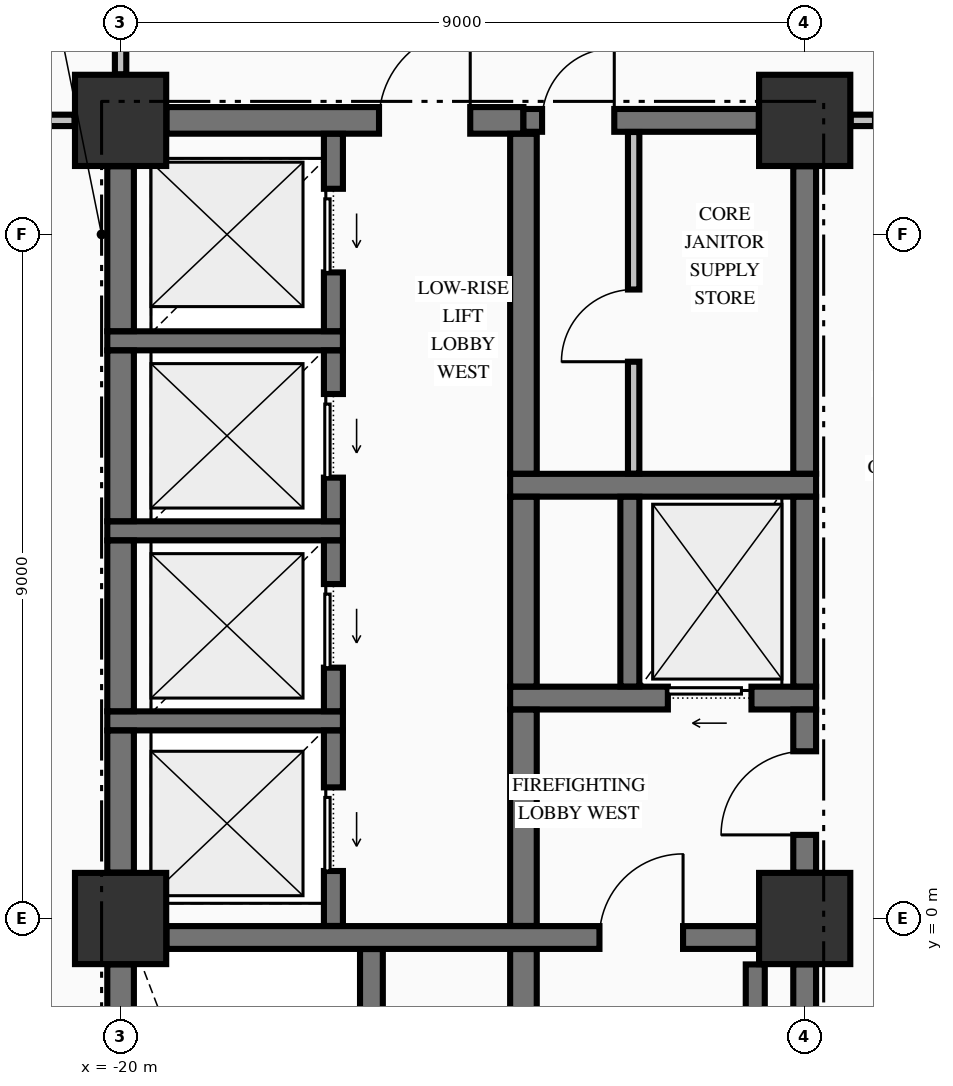
"""IFC4 building model, lengths in metres.
Left out: names, types, materials, properties, quantities, classifications, styles, units other than length and angle.
Written with IfcOpenShell. Run it as: python <this file> out.ifc"""

import sys

from ifc_helpers import new_model, si_unit, direction, frame, frame_2d, origin, origin_2d, place, context, subcontext, project, spatial, rectangle, extrude, element, fill, save


model = new_model("IFC4")
c1 = context("Model", 3, precision=1e-05, world=origin(), true_north=direction((0.0, 1.0)))
c2 = subcontext(c1, "Body", "Model", "MODEL_VIEW")
j1 = project(units=[si_unit("LENGTHUNIT", "METRE"), si_unit("PLANEANGLEUNIT", "RADIAN")], contexts=[c1])
p1 = place(None, origin())
s1 = spatial("IfcSite", under=j1, at=p1, CompositionType="ELEMENT")
p2 = place(p1, origin())
s2 = spatial("IfcBuilding", under=s1, at=p2, CompositionType="ELEMENT")
p3 = place(p2, frame((0.0, 0.0, 78.61)))
s3 = spatial("IfcBuildingStorey", under=s2, at=p3, CompositionType="ELEMENT", Elevation=78.61)
for number, where, z_axis, x_axis in (
    (1, (-20.0, 10.5, -0.25), (0.0, 0.0, 1.0), (1.0, 0.0, 0.0)),
    (2, (-11.0, 0.0, -0.25), (0.0, 0.0, 1.0), (1.0, 0.0, 0.0)),
    (3, (-11.0, 10.5, -0.25), (0.0, 0.0, 1.0), (1.0, 0.0, 0.0)),
    (4, (-20.0, 0.0, -0.25), (0.0, 0.0, 1.0), (1.0, 0.0, 0.0)),
):
    element("IfcColumn", number, at=place(p3, frame(where, z_axis=z_axis, x_axis=x_axis)), inside=s3, PredefinedType="COLUMN", context=c2, shape_type="SweptSolid", body=[
        extrude(rectangle(XDim=1.2, YDim=1.2, at=origin_2d()), origin(), (0.0, 0.0, 1.0), 3.395),
    ])
p4 = place(p3, frame((-19.396, -0.25, 0.0), z_axis=(0.0, 0.0, 1.0), x_axis=(1.0, 0.0, 0.0)))
e5 = element("IfcWall", 5, at=p4, inside=s3, PredefinedType="SHEAR", context=c2, shape_type="SweptSolid", body=[
    extrude(rectangle(XDim=7.792, YDim=0.3, at=frame_2d((3.896, 0.0))), origin(), (0.0, 0.0, 1.0), 3.145),
])
p5 = place(p4, frame((5.696, 0.0, 0.0)))
e6 = element("IfcOpeningElement", 6, at=p5, cuts=e5, PredefinedType="OPENING", context=c2, shape_type="SweptSolid", body=[
    extrude(rectangle(XDim=1.1, YDim=2.15, at=frame_2d((0.55, 1.075))), frame((0.0, 0.16, 0.0), z_axis=(0.0, -1.0, 0.0), x_axis=(1.0, 0.0, 0.0)), (0.0, 0.0, 1.0), 0.32),
])
p6 = place(p3, frame((-20.175, 2.6, 0.0), z_axis=(0.0, 0.0, 1.0), x_axis=(1.0, 0.0, 0.0)))
e7 = element("IfcWall", 7, at=p6, inside=s3, PredefinedType="SOLIDWALL", context=c2, shape_type="SweptSolid", body=[
    extrude(rectangle(XDim=3.1, YDim=0.25, at=frame_2d((1.55, 0.0))), origin(), (0.0, 0.0, 1.0), 3.145),
])
p7 = place(p3, frame((-14.875, 2.9, 0.0), z_axis=(0.0, 0.0, 1.0), x_axis=(1.0, 0.0, 0.0)))
e8 = element("IfcWall", 8, at=p7, inside=s3, PredefinedType="SHEAR", context=c2, shape_type="SweptSolid", body=[
    extrude(rectangle(XDim=4.025, YDim=0.3, at=frame_2d((2.012, 0.0))), origin(), (0.0, 0.0, 1.0), 3.145),
])
p8 = place(p7, frame((2.075, 0.0, 0.0)))
e9 = element("IfcOpeningElement", 9, at=p8, cuts=e8, PredefinedType="OPENING", context=c2, shape_type="SweptSolid", body=[
    extrude(rectangle(XDim=1.1, YDim=2.2, at=frame_2d((0.55, 1.1))), frame((0.0, 0.16, 0.0), z_axis=(0.0, -1.0, 0.0), x_axis=(1.0, 0.0, 0.0)), (0.0, 0.0, 1.0), 0.32),
])
p9 = place(p3, frame((-20.175, 5.1, 0.0), z_axis=(0.0, 0.0, 1.0), x_axis=(1.0, 0.0, 0.0)))
e10 = element("IfcWall", 10, at=p9, inside=s3, PredefinedType="SOLIDWALL", context=c2, shape_type="SweptSolid", body=[
    extrude(rectangle(XDim=3.1, YDim=0.25, at=frame_2d((1.55, 0.0))), origin(), (0.0, 0.0, 1.0), 3.145),
])
p10 = place(p3, frame((-14.875, 5.7, 0.0), z_axis=(0.0, 0.0, 1.0), x_axis=(1.0, 0.0, 0.0)))
e11 = element("IfcWall", 11, at=p10, inside=s3, PredefinedType="SHEAR", context=c2, shape_type="SweptSolid", body=[
    extrude(rectangle(XDim=4.025, YDim=0.3, at=frame_2d((2.012, 0.0))), origin(), (0.0, 0.0, 1.0), 3.145),
])
p11 = place(p3, frame((-20.175, 7.6, 0.0), z_axis=(0.0, 0.0, 1.0), x_axis=(1.0, 0.0, 0.0)))
e12 = element("IfcWall", 12, at=p11, inside=s3, PredefinedType="SOLIDWALL", context=c2, shape_type="SweptSolid", body=[
    extrude(rectangle(XDim=3.1, YDim=0.25, at=frame_2d((1.55, 0.0))), origin(), (0.0, 0.0, 1.0), 3.145),
])
p12 = place(p3, frame((-19.396, 10.5, 0.0), z_axis=(0.0, 0.0, 1.0), x_axis=(1.0, 0.0, 0.0)))
e13 = element("IfcWall", 13, at=p12, inside=s3, PredefinedType="SHEAR", context=c2, shape_type="SweptSolid", body=[
    extrude(rectangle(XDim=4.696, YDim=0.35, at=frame_2d((2.348, 0.0))), origin(), (0.0, 0.0, 1.0), 3.145),
])
p13 = place(p12, frame((2.796, 0.0, 0.0)))
e14 = element("IfcOpeningElement", 14, at=p13, cuts=e13, PredefinedType="OPENING", context=c2, shape_type="SweptSolid", body=[
    extrude(rectangle(XDim=1.2, YDim=2.15, at=frame_2d((0.6, 1.075))), frame((0.0, 0.185, 0.0), z_axis=(0.0, -1.0, 0.0), x_axis=(1.0, 0.0, 0.0)), (0.0, 0.0, 1.0), 0.37),
])
p14 = place(p3, frame((-14.7, 10.5, 0.0), z_axis=(0.0, 0.0, 1.0), x_axis=(1.0, 0.0, 0.0)))
e15 = element("IfcWall", 15, at=p14, inside=s3, PredefinedType="SHEAR", context=c2, shape_type="SweptSolid", body=[
    extrude(rectangle(XDim=3.096, YDim=0.3, at=frame_2d((1.548, 0.0))), origin(), (0.0, 0.0, 1.0), 3.145),
])
p15 = place(p14, frame((0.245, 0.0, 0.0)))
e16 = element("IfcOpeningElement", 16, at=p15, cuts=e15, PredefinedType="OPENING", context=c2, shape_type="SweptSolid", body=[
    extrude(rectangle(XDim=0.95, YDim=2.15, at=frame_2d((0.475, 1.075))), frame((0.0, 0.16, 0.0), z_axis=(0.0, -1.0, 0.0), x_axis=(1.0, 0.0, 0.0)), (0.0, 0.0, 1.0), 0.32),
])
p16 = place(p3, frame((-28.835, 10.5, 0.0), z_axis=(0.0, 0.0, 1.0), x_axis=(1.0, 0.0, 0.0)))
e17 = element("IfcWall", 17, at=p16, inside=s3, PredefinedType="PARTITIONING", context=c2, shape_type="SweptSolid", body=[
    extrude(rectangle(XDim=8.229, YDim=0.15, at=frame_2d((4.115, 0.0))), origin(), (0.0, 0.0, 1.0), 3.145),
])
p17 = place(p16, frame((3.86, 0.0, 0.0)))
e18 = element("IfcOpeningElement", 18, at=p17, cuts=e17, PredefinedType="OPENING", context=c2, shape_type="SweptSolid", body=[
    extrude(rectangle(XDim=0.95, YDim=2.15, at=frame_2d((0.475, 1.075))), frame((0.0, 0.085, 0.0), z_axis=(0.0, -1.0, 0.0), x_axis=(1.0, 0.0, 0.0)), (0.0, 0.0, 1.0), 0.17),
])
p18 = place(p3, frame((-10.394, 10.5, 0.0), z_axis=(0.0, 0.0, 1.0), x_axis=(1.0, 0.0, 0.0)))
e19 = element("IfcWall", 19, at=p18, inside=s3, PredefinedType="PARTITIONING", context=c2, shape_type="SweptSolid", body=[
    extrude(rectangle(XDim=20.788, YDim=0.15, at=frame_2d((10.394, 0.0))), origin(), (0.0, 0.0, 1.0), 3.145),
])
p19 = place(p18, frame((0.319, 0.0, 0.0)))
e20 = element("IfcOpeningElement", 20, at=p19, cuts=e19, PredefinedType="OPENING", context=c2, shape_type="SweptSolid", body=[
    extrude(rectangle(XDim=1.05, YDim=2.15, at=frame_2d((0.525, 1.075))), frame((0.0, 0.085, 0.0), z_axis=(0.0, -1.0, 0.0), x_axis=(1.0, 0.0, 0.0)), (0.0, 0.0, 1.0), 0.17),
])
p20 = place(p18, frame((19.419, 0.0, 0.0)))
e21 = element("IfcOpeningElement", 21, at=p20, cuts=e19, PredefinedType="OPENING", context=c2, shape_type="SweptSolid", body=[
    extrude(rectangle(XDim=1.05, YDim=2.15, at=frame_2d((0.525, 1.075))), frame((0.0, 0.085, 0.0), z_axis=(0.0, -1.0, 0.0), x_axis=(1.0, 0.0, 0.0)), (0.0, 0.0, 1.0), 0.17),
])
p21 = place(p3, frame((-20.0, -9.346, 0.0), z_axis=(0.0, 0.0, 1.0), x_axis=(0.0, 1.0, 0.0)))
e22 = element("IfcWall", 22, at=p21, inside=s3, PredefinedType="SHEAR", context=c2, shape_type="SweptSolid", body=[
    extrude(rectangle(XDim=8.742, YDim=0.35, at=frame_2d((4.371, 0.0))), origin(), (0.0, 0.0, 1.0), 3.145),
])
p22 = place(p3, frame((-20.0, 0.604, 0.0), z_axis=(0.0, 0.0, 1.0), x_axis=(0.0, 1.0, 0.0)))
e23 = element("IfcWall", 23, at=p22, inside=s3, PredefinedType="SHEAR", context=c2, shape_type="SweptSolid", body=[
    extrude(rectangle(XDim=1.869, YDim=0.35, at=frame_2d((0.935, 0.0))), origin(), (0.0, 0.0, 1.0), 3.145),
])
for number, where, z_axis, x_axis in (
    (24, (-20.0, 2.727, 0.0), (0.0, 0.0, 1.0), (0.0, 1.0, 0.0)),
    (25, (-20.0, 5.227, 0.0), (0.0, 0.0, 1.0), (0.0, 1.0, 0.0)),
):
    element("IfcWall", number, at=place(p3, frame(where, z_axis=z_axis, x_axis=x_axis)), inside=s3, PredefinedType="SHEAR", context=c2, shape_type="SweptSolid", body=[
        extrude(rectangle(XDim=2.246, YDim=0.35, at=frame_2d((1.123, 0.0))), origin(), (0.0, 0.0, 1.0), 3.145),
    ])
p23 = place(p3, frame((-20.0, 7.727, 0.0), z_axis=(0.0, 0.0, 1.0), x_axis=(0.0, 1.0, 0.0)))
e26 = element("IfcWall", 26, at=p23, inside=s3, PredefinedType="SHEAR", context=c2, shape_type="SweptSolid", body=[
    extrude(rectangle(XDim=2.169, YDim=0.35, at=frame_2d((1.084, 0.0))), origin(), (0.0, 0.0, 1.0), 3.145),
])
p24 = place(p3, frame((-17.2, -0.098, 0.0), z_axis=(0.0, 0.0, 1.0), x_axis=(0.0, 1.0, 0.0)))
e27 = element("IfcWall", 27, at=p24, inside=s3, PredefinedType="SOLIDWALL", context=c2, shape_type="SweptSolid", body=[
    extrude(rectangle(XDim=2.571, YDim=0.25, at=frame_2d((1.285, 0.0))), origin(), (0.0, 0.0, 1.0), 3.145),
])
p25 = place(p24, frame((0.723, 0.0, 0.0)))
e28 = element("IfcOpeningElement", 28, at=p25, cuts=e27, PredefinedType="OPENING", context=c2, shape_type="SweptSolid", body=[
    extrude(rectangle(XDim=1.1, YDim=2.2, at=frame_2d((0.55, 1.1))), frame((0.0, 0.135, 0.0), z_axis=(0.0, -1.0, 0.0), x_axis=(1.0, 0.0, 0.0)), (0.0, 0.0, 1.0), 0.27),
])
p26 = place(p3, frame((-17.2, 2.727, 0.0), z_axis=(0.0, 0.0, 1.0), x_axis=(0.0, 1.0, 0.0)))
e29 = element("IfcWall", 29, at=p26, inside=s3, PredefinedType="SOLIDWALL", context=c2, shape_type="SweptSolid", body=[
    extrude(rectangle(XDim=2.246, YDim=0.25, at=frame_2d((1.123, 0.0))), origin(), (0.0, 0.0, 1.0), 3.145),
])
p27 = place(p26, frame((0.573, 0.0, 0.0)))
e30 = element("IfcOpeningElement", 30, at=p27, cuts=e29, PredefinedType="OPENING", context=c2, shape_type="SweptSolid", body=[
    extrude(rectangle(XDim=1.1, YDim=2.2, at=frame_2d((0.55, 1.1))), frame((0.0, 0.135, 0.0), z_axis=(0.0, -1.0, 0.0), x_axis=(1.0, 0.0, 0.0)), (0.0, 0.0, 1.0), 0.27),
])
p28 = place(p3, frame((-17.2, 5.227, 0.0), z_axis=(0.0, 0.0, 1.0), x_axis=(0.0, 1.0, 0.0)))
e31 = element("IfcWall", 31, at=p28, inside=s3, PredefinedType="SOLIDWALL", context=c2, shape_type="SweptSolid", body=[
    extrude(rectangle(XDim=2.246, YDim=0.25, at=frame_2d((1.123, 0.0))), origin(), (0.0, 0.0, 1.0), 3.145),
])
p29 = place(p28, frame((0.573, 0.0, 0.0)))
e32 = element("IfcOpeningElement", 32, at=p29, cuts=e31, PredefinedType="OPENING", context=c2, shape_type="SweptSolid", body=[
    extrude(rectangle(XDim=1.1, YDim=2.2, at=frame_2d((0.55, 1.1))), frame((0.0, 0.135, 0.0), z_axis=(0.0, -1.0, 0.0), x_axis=(1.0, 0.0, 0.0)), (0.0, 0.0, 1.0), 0.27),
])
p30 = place(p3, frame((-17.2, 7.727, 0.0), z_axis=(0.0, 0.0, 1.0), x_axis=(0.0, 1.0, 0.0)))
e33 = element("IfcWall", 33, at=p30, inside=s3, PredefinedType="SOLIDWALL", context=c2, shape_type="SweptSolid", body=[
    extrude(rectangle(XDim=2.596, YDim=0.25, at=frame_2d((1.298, 0.0))), origin(), (0.0, 0.0, 1.0), 3.145),
])
p31 = place(p30, frame((0.773, 0.0, 0.0)))
e34 = element("IfcOpeningElement", 34, at=p31, cuts=e33, PredefinedType="OPENING", context=c2, shape_type="SweptSolid", body=[
    extrude(rectangle(XDim=1.1, YDim=2.2, at=frame_2d((0.55, 1.1))), frame((0.0, 0.135, 0.0), z_axis=(0.0, -1.0, 0.0), x_axis=(1.0, 0.0, 0.0)), (0.0, 0.0, 1.0), 0.27),
])
p32 = place(p3, frame((-16.7, -9.773, 0.0), z_axis=(0.0, 0.0, 1.0), x_axis=(0.0, 1.0, 0.0)))
e35 = element("IfcWall", 35, at=p32, inside=s3, PredefinedType="SHEAR", context=c2, shape_type="SweptSolid", body=[
    extrude(rectangle(XDim=9.371, YDim=0.3, at=frame_2d((4.686, 0.0))), origin(), (0.0, 0.0, 1.0), 3.145),
])
p33 = place(p3, frame((-14.7, -9.773, 0.0), z_axis=(0.0, 0.0, 1.0), x_axis=(0.0, 1.0, 0.0)))
e36 = element("IfcWall", 36, at=p33, inside=s3, PredefinedType="SHEAR", context=c2, shape_type="SweptSolid", body=[
    extrude(rectangle(XDim=9.371, YDim=0.35, at=frame_2d((4.686, 0.0))), origin(), (0.0, 0.0, 1.0), 3.145),
])
p34 = place(p3, frame((-14.7, -0.098, 0.0), z_axis=(0.0, 0.0, 1.0), x_axis=(0.0, 1.0, 0.0)))
e37 = element("IfcWall", 37, at=p34, inside=s3, PredefinedType="SHEAR", context=c2, shape_type="SweptSolid", body=[
    extrude(rectangle(XDim=2.846, YDim=0.35, at=frame_2d((1.423, 0.0))), origin(), (0.0, 0.0, 1.0), 3.145),
])
p35 = place(p3, frame((-14.7, 3.052, 0.0), z_axis=(0.0, 0.0, 1.0), x_axis=(0.0, 1.0, 0.0)))
e38 = element("IfcWall", 38, at=p35, inside=s3, PredefinedType="SHEAR", context=c2, shape_type="SweptSolid", body=[
    extrude(rectangle(XDim=2.496, YDim=0.35, at=frame_2d((1.248, 0.0))), origin(), (0.0, 0.0, 1.0), 3.145),
])
p36 = place(p3, frame((-14.7, 5.852, 0.0), z_axis=(0.0, 0.0, 1.0), x_axis=(0.0, 1.0, 0.0)))
e39 = element("IfcWall", 39, at=p36, inside=s3, PredefinedType="SHEAR", context=c2, shape_type="SweptSolid", body=[
    extrude(rectangle(XDim=4.471, YDim=0.35, at=frame_2d((2.235, 0.0))), origin(), (0.0, 0.0, 1.0), 3.145),
])
p37 = place(p3, frame((-13.3, 3.052, 0.0), z_axis=(0.0, 0.0, 1.0), x_axis=(0.0, 1.0, 0.0)))
e40 = element("IfcWall", 40, at=p37, inside=s3, PredefinedType="SOLIDWALL", context=c2, shape_type="SweptSolid", body=[
    extrude(rectangle(XDim=2.496, YDim=0.25, at=frame_2d((1.248, 0.0))), origin(), (0.0, 0.0, 1.0), 3.145),
])
p38 = place(p3, frame((-11.65, -9.346, 0.0), z_axis=(0.0, 0.0, 1.0), x_axis=(0.0, 1.0, 0.0)))
e41 = element("IfcWall", 41, at=p38, inside=s3, PredefinedType="SOLIDWALL", context=c2, shape_type="SweptSolid", body=[
    extrude(rectangle(XDim=8.742, YDim=0.25, at=frame_2d((4.371, 0.0))), origin(), (0.0, 0.0, 1.0), 3.145),
])
p39 = place(p3, frame((-11.0, -9.346, 0.0), z_axis=(0.0, 0.0, 1.0), x_axis=(0.0, 1.0, 0.0)))
e42 = element("IfcWall", 42, at=p39, inside=s3, PredefinedType="SHEAR", context=c2, shape_type="SweptSolid", body=[
    extrude(rectangle(XDim=8.742, YDim=0.3, at=frame_2d((4.371, 0.0))), origin(), (0.0, 0.0, 1.0), 3.145),
])
p40 = place(p3, frame((-11.0, 0.604, 0.0), z_axis=(0.0, 0.0, 1.0), x_axis=(0.0, 1.0, 0.0)))
e43 = element("IfcWall", 43, at=p40, inside=s3, PredefinedType="SHEAR", context=c2, shape_type="SweptSolid", body=[
    extrude(rectangle(XDim=2.144, YDim=0.3, at=frame_2d((1.072, 0.0))), origin(), (0.0, 0.0, 1.0), 3.145),
])
p41 = place(p40, frame((0.496, 0.0, 0.0)))
e44 = element("IfcOpeningElement", 44, at=p41, cuts=e43, PredefinedType="OPENING", context=c2, shape_type="SweptSolid", body=[
    extrude(rectangle(XDim=1.1, YDim=2.15, at=frame_2d((0.55, 1.075))), frame((0.0, 0.16, 0.0), z_axis=(0.0, -1.0, 0.0), x_axis=(1.0, 0.0, 0.0)), (0.0, 0.0, 1.0), 0.32),
])
p42 = place(p3, frame((-11.0, 3.052, 0.0), z_axis=(0.0, 0.0, 1.0), x_axis=(0.0, 1.0, 0.0)))
e45 = element("IfcWall", 45, at=p42, inside=s3, PredefinedType="SHEAR", context=c2, shape_type="SweptSolid", body=[
    extrude(rectangle(XDim=2.496, YDim=0.3, at=frame_2d((1.248, 0.0))), origin(), (0.0, 0.0, 1.0), 3.145),
])
p43 = place(p3, frame((-11.0, 5.852, 0.0), z_axis=(0.0, 0.0, 1.0), x_axis=(0.0, 1.0, 0.0)))
e46 = element("IfcWall", 46, at=p43, inside=s3, PredefinedType="SHEAR", context=c2, shape_type="SweptSolid", body=[
    extrude(rectangle(XDim=4.044, YDim=0.3, at=frame_2d((2.022, 0.0))), origin(), (0.0, 0.0, 1.0), 3.145),
])
p44 = place(p3, frame((-20.0, 11.106, 0.0), z_axis=(0.0, 0.0, 1.0), x_axis=(0.0, 1.0, 0.0)))
e47 = element("IfcWall", 47, at=p44, inside=s3, PredefinedType="PARTITIONING", context=c2, shape_type="SweptSolid", body=[
    extrude(rectangle(XDim=2.616, YDim=0.15, at=frame_2d((1.308, 0.0))), origin(), (0.0, 0.0, 1.0), 2.485),
])
p45 = place(p44, frame((0.569, 0.0, 0.0)))
e48 = element("IfcOpeningElement", 48, at=p45, cuts=e47, PredefinedType="OPENING", context=c2, shape_type="SweptSolid", body=[
    extrude(rectangle(XDim=0.95, YDim=2.15, at=frame_2d((0.475, 1.075))), frame((0.0, 0.085, 0.0), z_axis=(0.0, -1.0, 0.0), x_axis=(1.0, 0.0, 0.0)), (0.0, 0.0, 1.0), 0.17),
])
p46 = place(p3, frame((-13.25, 5.853, 0.0), z_axis=(0.0, 0.0, 1.0), x_axis=(0.0, 1.0, 0.0)))
e49 = element("IfcWall", 49, at=p46, inside=s3, PredefinedType="PARTITIONING", context=c2, shape_type="SweptSolid", body=[
    extrude(rectangle(XDim=4.494, YDim=0.15, at=frame_2d((2.247, 0.0))), origin(), (0.0, 0.0, 1.0), 3.145),
])
p47 = place(p46, frame((1.472, 0.0, 0.0)))
e50 = element("IfcOpeningElement", 50, at=p47, cuts=e49, PredefinedType="OPENING", context=c2, shape_type="SweptSolid", body=[
    extrude(rectangle(XDim=0.95, YDim=2.15, at=frame_2d((0.475, 1.075))), frame((0.0, 0.085, 0.0), z_axis=(0.0, -1.0, 0.0), x_axis=(1.0, 0.0, 0.0)), (0.0, 0.0, 1.0), 0.17),
])
p48 = place(p5, origin())
e51 = element("IfcDoor", 51, at=p48, inside=s3, OperationType="SINGLE_SWING_RIGHT", PredefinedType="DOOR", context=c2, shape_type="SweptSolid", body=[
    extrude(rectangle(XDim=1.1, YDim=2.15, at=frame_2d((0.55, 1.075))), frame((0.0, 0.025, 0.0), z_axis=(0.0, -1.0, 0.0), x_axis=(1.0, 0.0, 0.0)), (0.0, 0.0, 1.0), 0.05),
])
fill(e6, e51)
p49 = place(p41, origin())
e52 = element("IfcDoor", 52, at=p49, inside=s3, OperationType="SINGLE_SWING_LEFT", PredefinedType="DOOR", context=c2, shape_type="SweptSolid", body=[
    extrude(rectangle(XDim=1.1, YDim=2.15, at=frame_2d((0.55, 1.075))), frame((0.0, 0.025, 0.0), z_axis=(0.0, -1.0, 0.0), x_axis=(1.0, 0.0, 0.0)), (0.0, 0.0, 1.0), 0.05),
])
fill(e44, e52)
p50 = place(p8, origin())
e53 = element("IfcDoor", 53, at=p50, inside=s3, OperationType="SLIDING_TO_LEFT", PredefinedType="DOOR", context=c2, shape_type="SweptSolid", body=[
    extrude(rectangle(XDim=1.1, YDim=2.2, at=frame_2d((0.55, 1.1))), frame((0.0, 0.025, 0.0), z_axis=(0.0, -1.0, 0.0), x_axis=(1.0, 0.0, 0.0)), (0.0, 0.0, 1.0), 0.05),
])
fill(e9, e53)
p51 = place(p15, origin())
e54 = element("IfcDoor", 54, at=p51, inside=s3, OperationType="SINGLE_SWING_RIGHT", PredefinedType="DOOR", context=c2, shape_type="SweptSolid", body=[
    extrude(rectangle(XDim=0.95, YDim=2.15, at=frame_2d((0.475, 1.075))), frame((0.0, 0.025, 0.0), z_axis=(0.0, -1.0, 0.0), x_axis=(1.0, 0.0, 0.0)), (0.0, 0.0, 1.0), 0.05),
])
fill(e16, e54)
p52 = place(p47, origin())
e55 = element("IfcDoor", 55, at=p52, inside=s3, OperationType="SINGLE_SWING_LEFT", PredefinedType="DOOR", context=c2, shape_type="SweptSolid", body=[
    extrude(rectangle(XDim=0.95, YDim=2.15, at=frame_2d((0.475, 1.075))), frame((0.0, 0.025, 0.0), z_axis=(0.0, -1.0, 0.0), x_axis=(1.0, 0.0, 0.0)), (0.0, 0.0, 1.0), 0.05),
])
fill(e50, e55)
p53 = place(p13, origin())
e56 = element("IfcDoor", 56, at=p53, inside=s3, OperationType="SINGLE_SWING_RIGHT", PredefinedType="DOOR", context=c2, shape_type="SweptSolid", body=[
    extrude(rectangle(XDim=1.2, YDim=2.15, at=frame_2d((0.6, 1.075))), frame((0.0, 0.025, 0.0), z_axis=(0.0, -1.0, 0.0), x_axis=(1.0, 0.0, 0.0)), (0.0, 0.0, 1.0), 0.05),
])
fill(e14, e56)
p54 = place(p25, origin())
e57 = element("IfcDoor", 57, at=p54, inside=s3, OperationType="SLIDING_TO_LEFT", PredefinedType="DOOR", context=c2, shape_type="SweptSolid", body=[
    extrude(rectangle(XDim=1.1, YDim=2.2, at=frame_2d((0.55, 1.1))), frame((0.0, 0.025, 0.0), z_axis=(0.0, -1.0, 0.0), x_axis=(1.0, 0.0, 0.0)), (0.0, 0.0, 1.0), 0.05),
])
fill(e28, e57)
p55 = place(p27, origin())
e58 = element("IfcDoor", 58, at=p55, inside=s3, OperationType="SLIDING_TO_LEFT", PredefinedType="DOOR", context=c2, shape_type="SweptSolid", body=[
    extrude(rectangle(XDim=1.1, YDim=2.2, at=frame_2d((0.55, 1.1))), frame((0.0, 0.025, 0.0), z_axis=(0.0, -1.0, 0.0), x_axis=(1.0, 0.0, 0.0)), (0.0, 0.0, 1.0), 0.05),
])
fill(e30, e58)
p56 = place(p29, origin())
e59 = element("IfcDoor", 59, at=p56, inside=s3, OperationType="SLIDING_TO_LEFT", PredefinedType="DOOR", context=c2, shape_type="SweptSolid", body=[
    extrude(rectangle(XDim=1.1, YDim=2.2, at=frame_2d((0.55, 1.1))), frame((0.0, 0.025, 0.0), z_axis=(0.0, -1.0, 0.0), x_axis=(1.0, 0.0, 0.0)), (0.0, 0.0, 1.0), 0.05),
])
fill(e32, e59)
p57 = place(p31, origin())
e60 = element("IfcDoor", 60, at=p57, inside=s3, OperationType="SLIDING_TO_LEFT", PredefinedType="DOOR", context=c2, shape_type="SweptSolid", body=[
    extrude(rectangle(XDim=1.1, YDim=2.2, at=frame_2d((0.55, 1.1))), frame((0.0, 0.025, 0.0), z_axis=(0.0, -1.0, 0.0), x_axis=(1.0, 0.0, 0.0)), (0.0, 0.0, 1.0), 0.05),
])
fill(e34, e60)
save(model, sys.argv[1])
